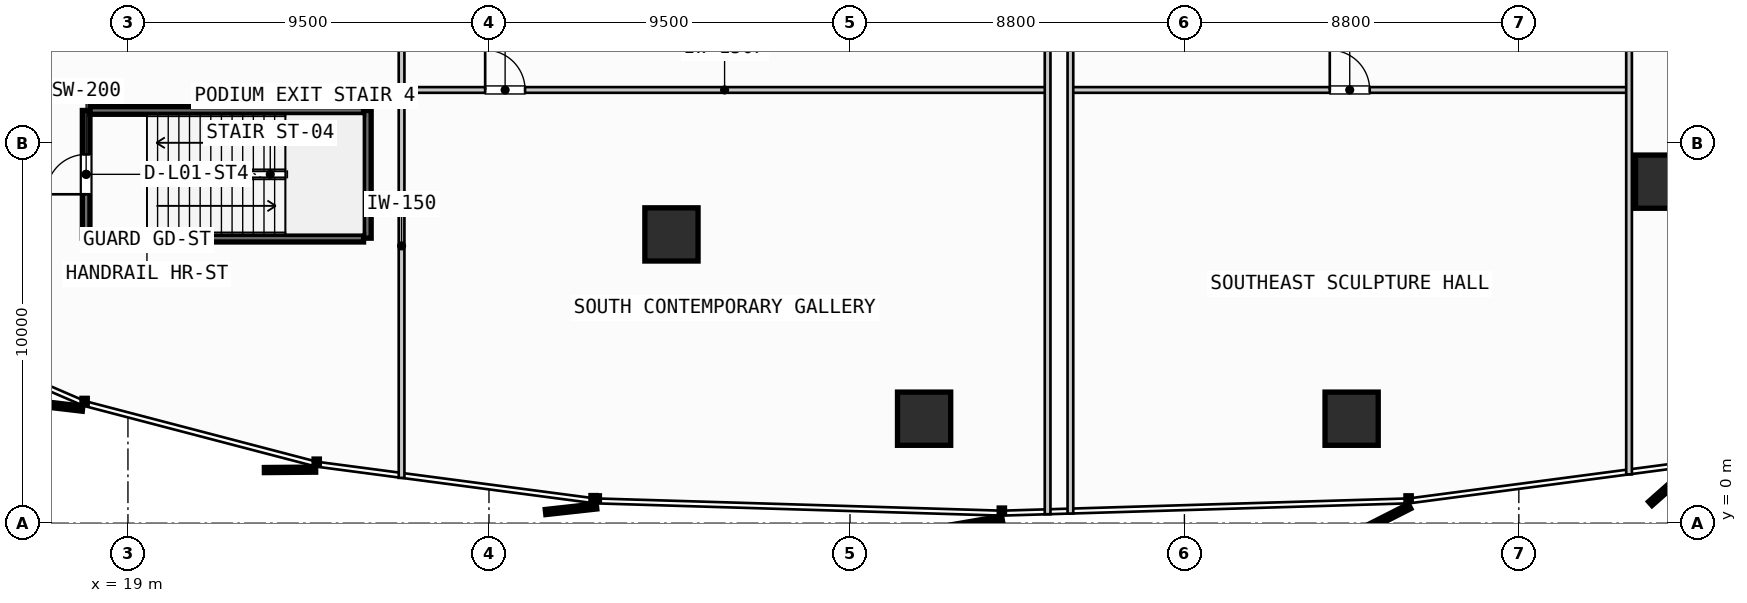
"""IFC4 building model, lengths in metres.
Left out: names, types, materials, properties, quantities, classifications, styles, units other than length and angle.
Written with IfcOpenShell. Run it as: python <this file> out.ifc"""

import sys

from ifc_helpers import new_model, si_unit, direction, frame, frame_2d, origin, origin_2d, place, context, subcontext, project, spatial, rectangle, hollow_rectangle, extrude, source, transform, mapped, element, fill, save


model = new_model("IFC4")
c1 = context("Model", 3, precision=1e-05, world=origin(), true_north=direction((0.0, 1.0)))
c2 = subcontext(c1, "Body", "Model", "MODEL_VIEW")
j1 = project(units=[si_unit("LENGTHUNIT", "METRE"), si_unit("PLANEANGLEUNIT", "RADIAN")], contexts=[c1])
p1 = place(None, origin())
s1 = spatial("IfcSite", under=j1, at=p1, CompositionType="ELEMENT")
p2 = place(p1, origin())
s2 = spatial("IfcBuilding", under=s1, at=p2, CompositionType="ELEMENT")
p3 = place(p2, frame((0.0, 0.0, 5.2)))
s3 = spatial("IfcBuildingStorey", under=s2, at=p3, CompositionType="ELEMENT", Elevation=5.2)
m1 = source(origin(), c2, "Body", "SweptSolid", [
    extrude(hollow_rectangle(XDim=1.4, YDim=1.4, WallThickness=0.05, InnerFilletRadius=0.025, OuterFilletRadius=0.075, at=origin_2d()), origin(), (0.0, 0.0, 1.0), 4.55),
])
for number, where, z_axis, x_axis in (
    (1, (33.302, 7.599, 0.0), (0.0, 0.0, 1.0), (1.0, 0.0, 0.0)),
    (2, (39.95, 2.75, 0.0), (0.0, 0.0, 1.0), (1.0, 0.0, 0.0)),
    (3, (51.2, 2.75, 0.0), (0.0, 0.0, 1.0), (1.0, 0.0, 0.0)),
    (4, (59.37, 8.987, 0.0), (0.0, 0.0, 1.0), (1.0, 0.0, 0.0)),
):
    element("IfcColumn", number, at=place(p3, frame(where, z_axis=z_axis, x_axis=x_axis)), inside=s3, PredefinedType="COLUMN", context=c2, shape_type="MappedRepresentation", body=[
        mapped(m1, transform((0.0, 0.0, 0.0), scale=1.0)),
    ])
p4 = place(p3, frame((17.9, 7.5, 0.0), z_axis=(0.0, 0.0, 1.0), x_axis=(0.0, 1.0, 0.0)))
e5 = element("IfcWall", 5, at=p4, inside=s3, PredefinedType="SHEAR", context=c2, shape_type="SweptSolid", body=[
    extrude(rectangle(XDim=3.36, YDim=0.2, at=frame_2d((1.68, 0.0))), origin(), (0.0, 0.0, 1.0), 4.55),
])
p5 = place(p4, frame((1.155, 0.0, 0.0)))
e6 = element("IfcOpeningElement", 6, at=p5, cuts=e5, PredefinedType="OPENING", context=c2, shape_type="SweptSolid", body=[
    extrude(rectangle(XDim=1.05, YDim=2.15, at=frame_2d((0.525, 1.075))), frame((0.0, 0.11, 0.0), z_axis=(0.0, -1.0, 0.0), x_axis=(1.0, 0.0, 0.0)), (0.0, 0.0, 1.0), 0.22),
])
p6 = place(p3, frame((25.3, 10.86, 0.0), z_axis=(0.0, 0.0, 1.0), x_axis=(0.0, -1.0, 0.0)))
e7 = element("IfcWall", 7, at=p6, inside=s3, PredefinedType="SHEAR", context=c2, shape_type="SweptSolid", body=[
    extrude(rectangle(XDim=3.36, YDim=0.2, at=frame_2d((1.68, 0.0))), origin(), (0.0, 0.0, 1.0), 4.55),
])
for number, where, z_axis, x_axis in (
    (8, (25.2, 7.5, 0.0), (0.0, 0.0, 1.0), (-1.0, 0.0, 0.0)),
    (9, (18.0, 10.86, 0.0), (0.0, 0.0, 1.0), (1.0, 0.0, 0.0)),
):
    element("IfcWall", number, at=place(p3, frame(where, z_axis=z_axis, x_axis=x_axis)), inside=s3, PredefinedType="SHEAR", context=c2, shape_type="SweptSolid", body=[
        extrude(rectangle(XDim=7.2, YDim=0.2, at=frame_2d((3.6, 0.0))), origin(), (0.0, 0.0, 1.0), 4.55),
    ])
p7 = place(p3, frame((26.2, 11.4, 0.0), z_axis=(0.0, 0.0, 1.0), x_axis=(1.0, 0.0, 0.0)))
e10 = element("IfcWall", 10, at=p7, inside=s3, PredefinedType="PARTITIONING", context=c2, shape_type="SweptSolid", body=[
    extrude(rectangle(XDim=17.0, YDim=0.15, at=frame_2d((8.5, 0.0))), origin(), (0.0, 0.0, 1.0), 3.763),
])
p8 = place(p7, frame((2.2, 0.0, 0.0)))
e11 = element("IfcOpeningElement", 11, at=p8, cuts=e10, PredefinedType="OPENING", context=c2, shape_type="SweptSolid", body=[
    extrude(rectangle(XDim=1.05, YDim=2.15, at=frame_2d((0.525, 1.075))), frame((0.0, 0.085, 0.0), z_axis=(0.0, -1.0, 0.0), x_axis=(1.0, 0.0, 0.0)), (0.0, 0.0, 1.0), 0.17),
])
p9 = place(p3, frame((26.2, 1.193, 0.0), z_axis=(0.0, 0.0, 1.0), x_axis=(0.0, 1.0, 0.0)))
e12 = element("IfcWall", 12, at=p9, inside=s3, PredefinedType="PARTITIONING", context=c2, shape_type="SweptSolid", body=[
    extrude(rectangle(XDim=12.207, YDim=0.15, at=frame_2d((6.104, 0.0))), origin(), (0.0, 0.0, 1.0), 3.763),
])
p10 = place(p3, frame((43.2, 0.236, 0.0), z_axis=(0.0, 0.0, 1.0), x_axis=(0.0, 1.0, 0.0)))
e13 = element("IfcWall", 13, at=p10, inside=s3, PredefinedType="PARTITIONING", context=c2, shape_type="SweptSolid", body=[
    extrude(rectangle(XDim=13.164, YDim=0.15, at=frame_2d((6.582, 0.0))), origin(), (0.0, 0.0, 1.0), 3.763),
])
p11 = place(p3, frame((43.8, 11.4, 0.0), z_axis=(0.0, 0.0, 1.0), x_axis=(1.0, 0.0, 0.0)))
e14 = element("IfcWall", 14, at=p11, inside=s3, PredefinedType="PARTITIONING", context=c2, shape_type="SweptSolid", body=[
    extrude(rectangle(XDim=14.7, YDim=0.15, at=frame_2d((7.35, 0.0))), origin(), (0.0, 0.0, 1.0), 3.763),
])
p12 = place(p11, frame((6.825, 0.0, 0.0)))
e15 = element("IfcOpeningElement", 15, at=p12, cuts=e14, PredefinedType="OPENING", context=c2, shape_type="SweptSolid", body=[
    extrude(rectangle(XDim=1.05, YDim=2.15, at=frame_2d((0.525, 1.075))), frame((0.0, 0.085, 0.0), z_axis=(0.0, -1.0, 0.0), x_axis=(1.0, 0.0, 0.0)), (0.0, 0.0, 1.0), 0.17),
])
p13 = place(p3, frame((43.8, 0.254, 0.0), z_axis=(0.0, 0.0, 1.0), x_axis=(0.0, 1.0, 0.0)))
e16 = element("IfcWall", 16, at=p13, inside=s3, PredefinedType="PARTITIONING", context=c2, shape_type="SweptSolid", body=[
    extrude(rectangle(XDim=13.146, YDim=0.15, at=frame_2d((6.573, 0.0))), origin(), (0.0, 0.0, 1.0), 3.763),
])
p14 = place(p3, frame((58.5, 1.285, 0.0), z_axis=(0.0, 0.0, 1.0), x_axis=(0.0, 1.0, 0.0)))
e17 = element("IfcWall", 17, at=p14, inside=s3, PredefinedType="PARTITIONING", context=c2, shape_type="SweptSolid", body=[
    extrude(rectangle(XDim=12.115, YDim=0.15, at=frame_2d((6.057, 0.0))), origin(), (0.0, 0.0, 1.0), 3.763),
])
m2 = source(origin(), c2, "Body", "SweptSolid", [
    extrude(rectangle(XDim=1.05, YDim=2.15, at=frame_2d((0.525, 1.075))), frame((0.0, 0.025, 0.0), z_axis=(0.0, -1.0, 0.0), x_axis=(1.0, 0.0, 0.0)), (0.0, 0.0, 1.0), 0.05),
])
p15 = place(p5, origin())
e18 = element("IfcDoor", 18, at=p15, inside=s3, OperationType="SINGLE_SWING_LEFT", PredefinedType="DOOR", context=c2, shape_type="MappedRepresentation", body=[
    mapped(m2, transform((0.0, 0.0, 0.0), scale=1.0)),
])
fill(e6, e18)
p16 = place(p8, origin())
e19 = element("IfcDoor", 19, at=p16, inside=s3, OperationType="SINGLE_SWING_LEFT", PredefinedType="DOOR", context=c2, shape_type="MappedRepresentation", body=[
    mapped(m2, transform((0.0, 0.0, 0.0), scale=1.0)),
])
fill(e11, e19)
p17 = place(p12, origin())
e20 = element("IfcDoor", 20, at=p17, inside=s3, OperationType="SINGLE_SWING_LEFT", PredefinedType="DOOR", context=c2, shape_type="MappedRepresentation", body=[
    mapped(m2, transform((0.0, 0.0, 0.0), scale=1.0)),
])
fill(e15, e20)
save(model, sys.argv[1])
